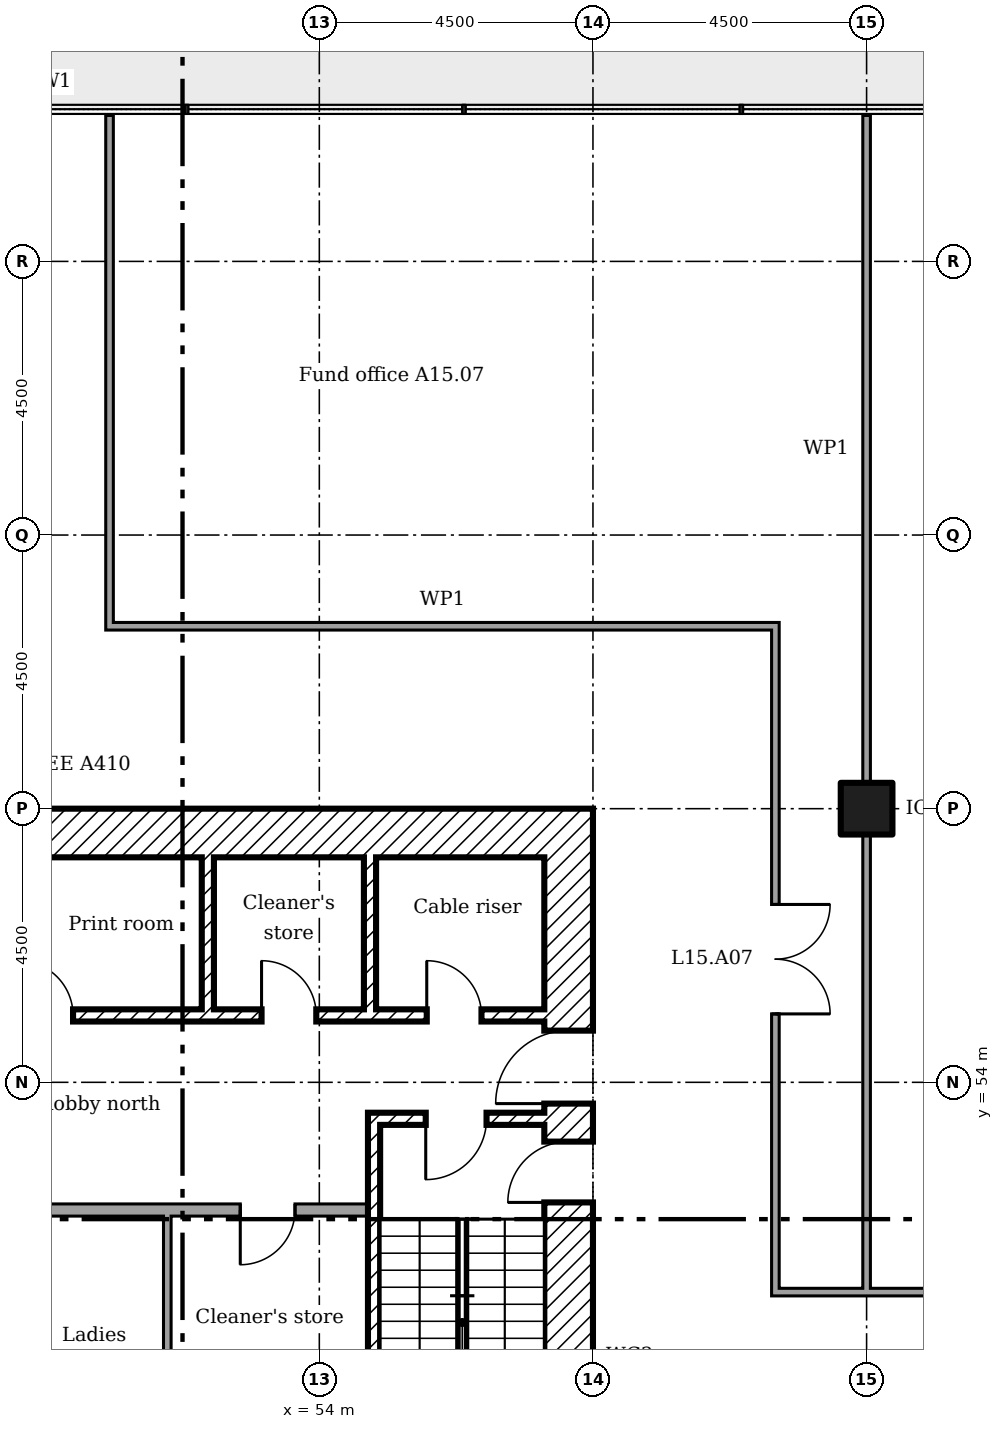
"""IFC4 building model, lengths in metres.
Left out: names, types, materials, properties, quantities, classifications, styles, units other than length and angle.
Written with IfcOpenShell. Run it as: python <this file> out.ifc"""

import sys

from ifc_helpers import new_model, si_unit, direction, frame, frame_2d, origin, origin_2d, place, context, subcontext, project, spatial, rectangle, extrude, element, fill, save


model = new_model("IFC4")
c1 = context("Model", 3, precision=1e-05, world=origin(), true_north=direction((0.0, 1.0)))
c2 = subcontext(c1, "Body", "Model", "MODEL_VIEW")
j1 = project(units=[si_unit("LENGTHUNIT", "METRE"), si_unit("PLANEANGLEUNIT", "RADIAN")], contexts=[c1])
p1 = place(None, origin())
s1 = spatial("IfcSite", under=j1, at=p1, CompositionType="ELEMENT")
p2 = place(p1, origin())
s2 = spatial("IfcBuilding", under=s1, at=p2, CompositionType="ELEMENT")
p3 = place(p2, frame((0.0, 0.0, 65.4)))
s3 = spatial("IfcBuildingStorey", under=s2, at=p3, CompositionType="ELEMENT", Elevation=65.4)
p4 = place(p3, frame((63.0, 58.5, 0.0)))
e1 = element("IfcColumn", 1, at=p4, inside=s3, PredefinedType="COLUMN", context=c2, shape_type="SweptSolid", body=[
    extrude(rectangle(XDim=0.85, YDim=0.85, at=origin_2d()), origin(), (0.0, 0.0, 1.0), 3.6),
])
p5 = place(p3, frame((58.1, 40.5, 0.0), z_axis=(0.0, 0.0, 1.0), x_axis=(0.0, 1.0, 0.0)))
e2 = element("IfcWall", 2, at=p5, inside=s3, PredefinedType="SHEAR", context=c2, shape_type="SweptSolid", body=[
    extrude(rectangle(XDim=18.0, YDim=0.8, at=frame_2d((9.0, 0.0))), origin(), (0.0, 0.0, 1.0), 3.35),
])
p6 = place(p5, frame((13.15, 0.0, 0.0)))
e3 = element("IfcOpeningElement", 3, at=p6, cuts=e2, PredefinedType="OPENING", context=c2, shape_type="SweptSolid", body=[
    extrude(rectangle(XDim=1.2, YDim=2.1, at=frame_2d((0.6, 1.05))), frame((0.0, 0.41, 0.0), z_axis=(0.0, -1.0, 0.0), x_axis=(1.0, 0.0, 0.0)), (0.0, 0.0, 1.0), 0.82),
])
p7 = place(p5, frame((3.9, 0.0, 0.0)))
e4 = element("IfcOpeningElement", 4, at=p7, cuts=e2, PredefinedType="OPENING", context=c2, shape_type="SweptSolid", body=[
    extrude(rectangle(XDim=1.8, YDim=2.1, at=frame_2d((0.9, 1.05))), frame((0.0, 0.41, 0.0), z_axis=(0.0, -1.0, 0.0), x_axis=(1.0, 0.0, 0.0)), (0.0, 0.0, 1.0), 0.82),
])
p8 = place(p5, frame((11.525, 0.0, 0.0)))
e5 = element("IfcOpeningElement", 5, at=p8, cuts=e2, PredefinedType="OPENING", context=c2, shape_type="SweptSolid", body=[
    extrude(rectangle(XDim=1.0, YDim=2.1, at=frame_2d((0.5, 1.05))), frame((0.0, 0.41, 0.0), z_axis=(0.0, -1.0, 0.0), x_axis=(1.0, 0.0, 0.0)), (0.0, 0.0, 1.0), 0.82),
])
p9 = place(p3, frame((41.3, 58.1, 0.0)))
e6 = element("IfcWall", 6, at=p9, inside=s3, PredefinedType="SHEAR", context=c2, shape_type="SweptSolid", body=[
    extrude(rectangle(XDim=16.4, YDim=0.8, at=frame_2d((8.2, 0.0))), origin(), (0.0, 0.0, 1.0), 3.35),
])
for number, where, z_axis, x_axis in (
    (7, (52.167, 57.7, 0.0), (0.0, 0.0, 1.0), (0.0, -1.0, 0.0)),
    (8, (54.833, 57.7, 0.0), (0.0, 0.0, 1.0), (0.0, -1.0, 0.0)),
):
    element("IfcWall", number, at=place(p3, frame(where, z_axis=z_axis, x_axis=x_axis)), inside=s3, PredefinedType="SHEAR", context=c2, shape_type="SweptSolid", body=[
        extrude(rectangle(XDim=2.5, YDim=0.2, at=frame_2d((1.25, 0.0))), origin(), (0.0, 0.0, 1.0), 3.35),
    ])
p10 = place(p3, frame((46.933, 55.1, 0.0)))
e9 = element("IfcWall", 9, at=p10, inside=s3, PredefinedType="SHEAR", context=c2, shape_type="SweptSolid", body=[
    extrude(rectangle(XDim=10.767, YDim=0.2, at=frame_2d((5.383, 0.0))), origin(), (0.0, 0.0, 1.0), 3.35),
])
p11 = place(p10, frame((8.833, 0.0, 0.0)))
e10 = element("IfcOpeningElement", 10, at=p11, cuts=e9, PredefinedType="OPENING", context=c2, shape_type="SweptSolid", body=[
    extrude(rectangle(XDim=0.9, YDim=2.1, at=frame_2d((0.45, 1.05))), frame((0.0, 0.11, 0.0), z_axis=(0.0, -1.0, 0.0), x_axis=(1.0, 0.0, 0.0)), (0.0, 0.0, 1.0), 0.22),
])
p12 = place(p10, frame((2.117, 0.0, 0.0)))
e11 = element("IfcOpeningElement", 11, at=p12, cuts=e9, PredefinedType="OPENING", context=c2, shape_type="SweptSolid", body=[
    extrude(rectangle(XDim=0.9, YDim=2.1, at=frame_2d((0.45, 1.05))), frame((0.0, 0.11, 0.0), z_axis=(0.0, -1.0, 0.0), x_axis=(1.0, 0.0, 0.0)), (0.0, 0.0, 1.0), 0.22),
])
p13 = place(p10, frame((6.117, 0.0, 0.0)))
e12 = element("IfcOpeningElement", 12, at=p13, cuts=e9, PredefinedType="OPENING", context=c2, shape_type="SweptSolid", body=[
    extrude(rectangle(XDim=0.9, YDim=2.1, at=frame_2d((0.45, 1.05))), frame((0.0, 0.11, 0.0), z_axis=(0.0, -1.0, 0.0), x_axis=(1.0, 0.0, 0.0)), (0.0, 0.0, 1.0), 0.22),
])
p14 = place(p3, frame((54.8, 53.4, 0.0)))
e13 = element("IfcWall", 13, at=p14, inside=s3, PredefinedType="SHEAR", context=c2, shape_type="SweptSolid", body=[
    extrude(rectangle(XDim=2.9, YDim=0.2, at=frame_2d((1.45, 0.0))), origin(), (0.0, 0.0, 1.0), 3.35),
])
p15 = place(p14, frame((0.95, 0.0, 0.0)))
e14 = element("IfcOpeningElement", 14, at=p15, cuts=e13, PredefinedType="OPENING", context=c2, shape_type="SweptSolid", body=[
    extrude(rectangle(XDim=1.0, YDim=2.1, at=frame_2d((0.5, 1.05))), frame((0.0, 0.11, 0.0), z_axis=(0.0, -1.0, 0.0), x_axis=(1.0, 0.0, 0.0)), (0.0, 0.0, 1.0), 0.22),
])
p16 = place(p3, frame((54.9, 46.8, 0.0), z_axis=(0.0, 0.0, 1.0), x_axis=(0.0, 1.0, 0.0)))
e15 = element("IfcWall", 15, at=p16, inside=s3, PredefinedType="SHEAR", context=c2, shape_type="SweptSolid", body=[
    extrude(rectangle(XDim=6.5, YDim=0.2, at=frame_2d((3.25, 0.0))), origin(), (0.0, 0.0, 1.0), 3.35),
])
p17 = place(p3, frame((44.2, 51.9, 0.0)))
e16 = element("IfcWall", 16, at=p17, inside=s3, PredefinedType="PARTITIONING", context=c2, shape_type="SweptSolid", body=[
    extrude(rectangle(XDim=10.6, YDim=0.2, at=frame_2d((5.3, 0.0))), origin(), (0.0, 0.0, 1.0), 3.35),
])
p18 = place(p17, frame((8.5, 0.0, 0.0)))
e17 = element("IfcOpeningElement", 17, at=p18, cuts=e16, PredefinedType="OPENING", context=c2, shape_type="SweptSolid", body=[
    extrude(rectangle(XDim=0.9, YDim=2.1, at=frame_2d((0.45, 1.05))), frame((0.0, 0.11, 0.0), z_axis=(0.0, -1.0, 0.0), x_axis=(1.0, 0.0, 0.0)), (0.0, 0.0, 1.0), 0.22),
])
p19 = place(p3, frame((51.5, 49.5, 0.0), z_axis=(0.0, 0.0, 1.0), x_axis=(0.0, 1.0, 0.0)))
e18 = element("IfcWall", 18, at=p19, inside=s3, PredefinedType="PARTITIONING", context=c2, shape_type="SweptSolid", body=[
    extrude(rectangle(XDim=2.3, YDim=0.125, at=frame_2d((1.15, 0.0))), origin(), (0.0, 0.0, 1.0), 3.35),
])
p20 = place(p3, frame((61.438, 50.55, 0.0)))
e19 = element("IfcWall", 19, at=p20, inside=s3, PredefinedType="PARTITIONING", context=c2, shape_type="SweptSolid", body=[
    extrude(rectangle(XDim=8.462, YDim=0.125, at=frame_2d((4.231, 0.0))), origin(), (0.0, 0.0, 1.0), 3.45),
])
p21 = place(p20, frame((4.847, 0.0, 0.0)))
e20 = element("IfcOpeningElement", 20, at=p21, cuts=e19, PredefinedType="OPENING", context=c2, shape_type="SweptSolid", body=[
    extrude(rectangle(XDim=1.8, YDim=2.1, at=frame_2d((0.9, 1.05))), frame((0.0, 0.073, 0.0), z_axis=(0.0, -1.0, 0.0), x_axis=(1.0, 0.0, 0.0)), (0.0, 0.0, 1.0), 0.145),
])
p22 = place(p3, frame((50.488, 61.5, 0.0)))
e21 = element("IfcWall", 21, at=p22, inside=s3, PredefinedType="PARTITIONING", context=c2, shape_type="SweptSolid", body=[
    extrude(rectangle(XDim=11.075, YDim=0.125, at=frame_2d((5.538, 0.0))), origin(), (0.0, 0.0, 1.0), 3.45),
])
p23 = place(p3, frame((50.55, 61.562, 0.0), z_axis=(0.0, 0.0, 1.0), x_axis=(0.0, 1.0, 0.0)))
e22 = element("IfcWall", 22, at=p23, inside=s3, PredefinedType="PARTITIONING", context=c2, shape_type="SweptSolid", body=[
    extrude(rectangle(XDim=8.337, YDim=0.125, at=frame_2d((4.169, 0.0))), origin(), (0.0, 0.0, 1.0), 3.45),
])
p24 = place(p3, frame((61.5, 50.613, 0.0), z_axis=(0.0, 0.0, 1.0), x_axis=(0.0, 1.0, 0.0)))
e23 = element("IfcWall", 23, at=p24, inside=s3, PredefinedType="PARTITIONING", context=c2, shape_type="SweptSolid", body=[
    extrude(rectangle(XDim=10.825, YDim=0.125, at=frame_2d((5.413, 0.0))), origin(), (0.0, 0.0, 1.0), 3.45),
])
p25 = place(p24, frame((4.512, 0.0, 0.0)))
e24 = element("IfcOpeningElement", 24, at=p25, cuts=e23, PredefinedType="OPENING", context=c2, shape_type="SweptSolid", body=[
    extrude(rectangle(XDim=1.8, YDim=2.1, at=frame_2d((0.9, 1.05))), frame((0.0, 0.073, 0.0), z_axis=(0.0, -1.0, 0.0), x_axis=(1.0, 0.0, 0.0)), (0.0, 0.0, 1.0), 0.145),
])
p26 = place(p3, frame((63.0, 50.55, 0.0), z_axis=(0.0, 0.0, 1.0), x_axis=(0.0, 1.0, 0.0)))
e25 = element("IfcWall", 25, at=p26, inside=s3, PredefinedType="PARTITIONING", context=c2, shape_type="SweptSolid", body=[
    extrude(rectangle(XDim=7.525, YDim=0.125, at=frame_2d((3.762, 0.0))), origin(), (0.0, 0.0, 1.0), 3.45),
])
p27 = place(p3, frame((63.0, 58.925, 0.0), z_axis=(0.0, 0.0, 1.0), x_axis=(0.0, 1.0, 0.0)))
e26 = element("IfcWall", 26, at=p27, inside=s3, PredefinedType="PARTITIONING", context=c2, shape_type="SweptSolid", body=[
    extrude(rectangle(XDim=10.975, YDim=0.125, at=frame_2d((5.487, 0.0))), origin(), (0.0, 0.0, 1.0), 2.766),
])
p28 = place(p6, origin())
e27 = element("IfcDoor", 27, at=p28, inside=s3, OperationType="SINGLE_SWING_RIGHT", PredefinedType="DOOR", context=c2, shape_type="SweptSolid", body=[
    extrude(rectangle(XDim=1.2, YDim=2.1, at=frame_2d((0.6, 1.05))), frame((0.0, 0.025, 0.0), z_axis=(0.0, -1.0, 0.0), x_axis=(1.0, 0.0, 0.0)), (0.0, 0.0, 1.0), 0.05),
])
fill(e3, e27)
p29 = place(p15, frame((1.0, 0.0, 0.0), x_axis=(-1.0, 0.0, 0.0)))
e28 = element("IfcDoor", 28, at=p29, inside=s3, OperationType="SINGLE_SWING_LEFT", PredefinedType="DOOR", context=c2, shape_type="SweptSolid", body=[
    extrude(rectangle(XDim=1.0, YDim=2.1, at=frame_2d((0.5, 1.05))), frame((0.0, 0.025, 0.0), z_axis=(0.0, -1.0, 0.0), x_axis=(1.0, 0.0, 0.0)), (0.0, 0.0, 1.0), 0.05),
])
fill(e14, e28)
p30 = place(p8, origin())
e29 = element("IfcDoor", 29, at=p30, inside=s3, OperationType="SINGLE_SWING_RIGHT", PredefinedType="DOOR", context=c2, shape_type="SweptSolid", body=[
    extrude(rectangle(XDim=1.0, YDim=2.1, at=frame_2d((0.5, 1.05))), frame((0.0, 0.025, 0.0), z_axis=(0.0, -1.0, 0.0), x_axis=(1.0, 0.0, 0.0)), (0.0, 0.0, 1.0), 0.05),
])
fill(e5, e29)
p31 = place(p11, origin())
e30 = element("IfcDoor", 30, at=p31, inside=s3, OperationType="SINGLE_SWING_RIGHT", PredefinedType="DOOR", context=c2, shape_type="SweptSolid", body=[
    extrude(rectangle(XDim=0.9, YDim=2.1, at=frame_2d((0.45, 1.05))), frame((0.0, 0.025, 0.0), z_axis=(0.0, -1.0, 0.0), x_axis=(1.0, 0.0, 0.0)), (0.0, 0.0, 1.0), 0.05),
])
fill(e10, e30)
p32 = place(p12, origin())
e31 = element("IfcDoor", 31, at=p32, inside=s3, OperationType="SINGLE_SWING_RIGHT", PredefinedType="DOOR", context=c2, shape_type="SweptSolid", body=[
    extrude(rectangle(XDim=0.9, YDim=2.1, at=frame_2d((0.45, 1.05))), frame((0.0, 0.025, 0.0), z_axis=(0.0, -1.0, 0.0), x_axis=(1.0, 0.0, 0.0)), (0.0, 0.0, 1.0), 0.05),
])
fill(e11, e31)
p33 = place(p13, origin())
e32 = element("IfcDoor", 32, at=p33, inside=s3, OperationType="SINGLE_SWING_RIGHT", PredefinedType="DOOR", context=c2, shape_type="SweptSolid", body=[
    extrude(rectangle(XDim=0.9, YDim=2.1, at=frame_2d((0.45, 1.05))), frame((0.0, 0.025, 0.0), z_axis=(0.0, -1.0, 0.0), x_axis=(1.0, 0.0, 0.0)), (0.0, 0.0, 1.0), 0.05),
])
fill(e12, e32)
p34 = place(p18, frame((0.9, 0.0, 0.0), x_axis=(-1.0, 0.0, 0.0)))
e33 = element("IfcDoor", 33, at=p34, inside=s3, OperationType="SINGLE_SWING_LEFT", PredefinedType="DOOR", context=c2, shape_type="SweptSolid", body=[
    extrude(rectangle(XDim=0.9, YDim=2.1, at=frame_2d((0.45, 1.05))), frame((0.0, 0.025, 0.0), z_axis=(0.0, -1.0, 0.0), x_axis=(1.0, 0.0, 0.0)), (0.0, 0.0, 1.0), 0.05),
])
fill(e17, e33)
p35 = place(p25, frame((1.8, 0.0, 0.0), x_axis=(-1.0, 0.0, 0.0)))
e34 = element("IfcDoor", 34, at=p35, inside=s3, OperationType="DOUBLE_DOOR_SINGLE_SWING", PredefinedType="DOOR", context=c2, shape_type="SweptSolid", body=[
    extrude(rectangle(XDim=1.8, YDim=2.1, at=frame_2d((0.9, 1.05))), frame((0.0, 0.025, 0.0), z_axis=(0.0, -1.0, 0.0), x_axis=(1.0, 0.0, 0.0)), (0.0, 0.0, 1.0), 0.05),
])
fill(e24, e34)
save(model, sys.argv[1])
